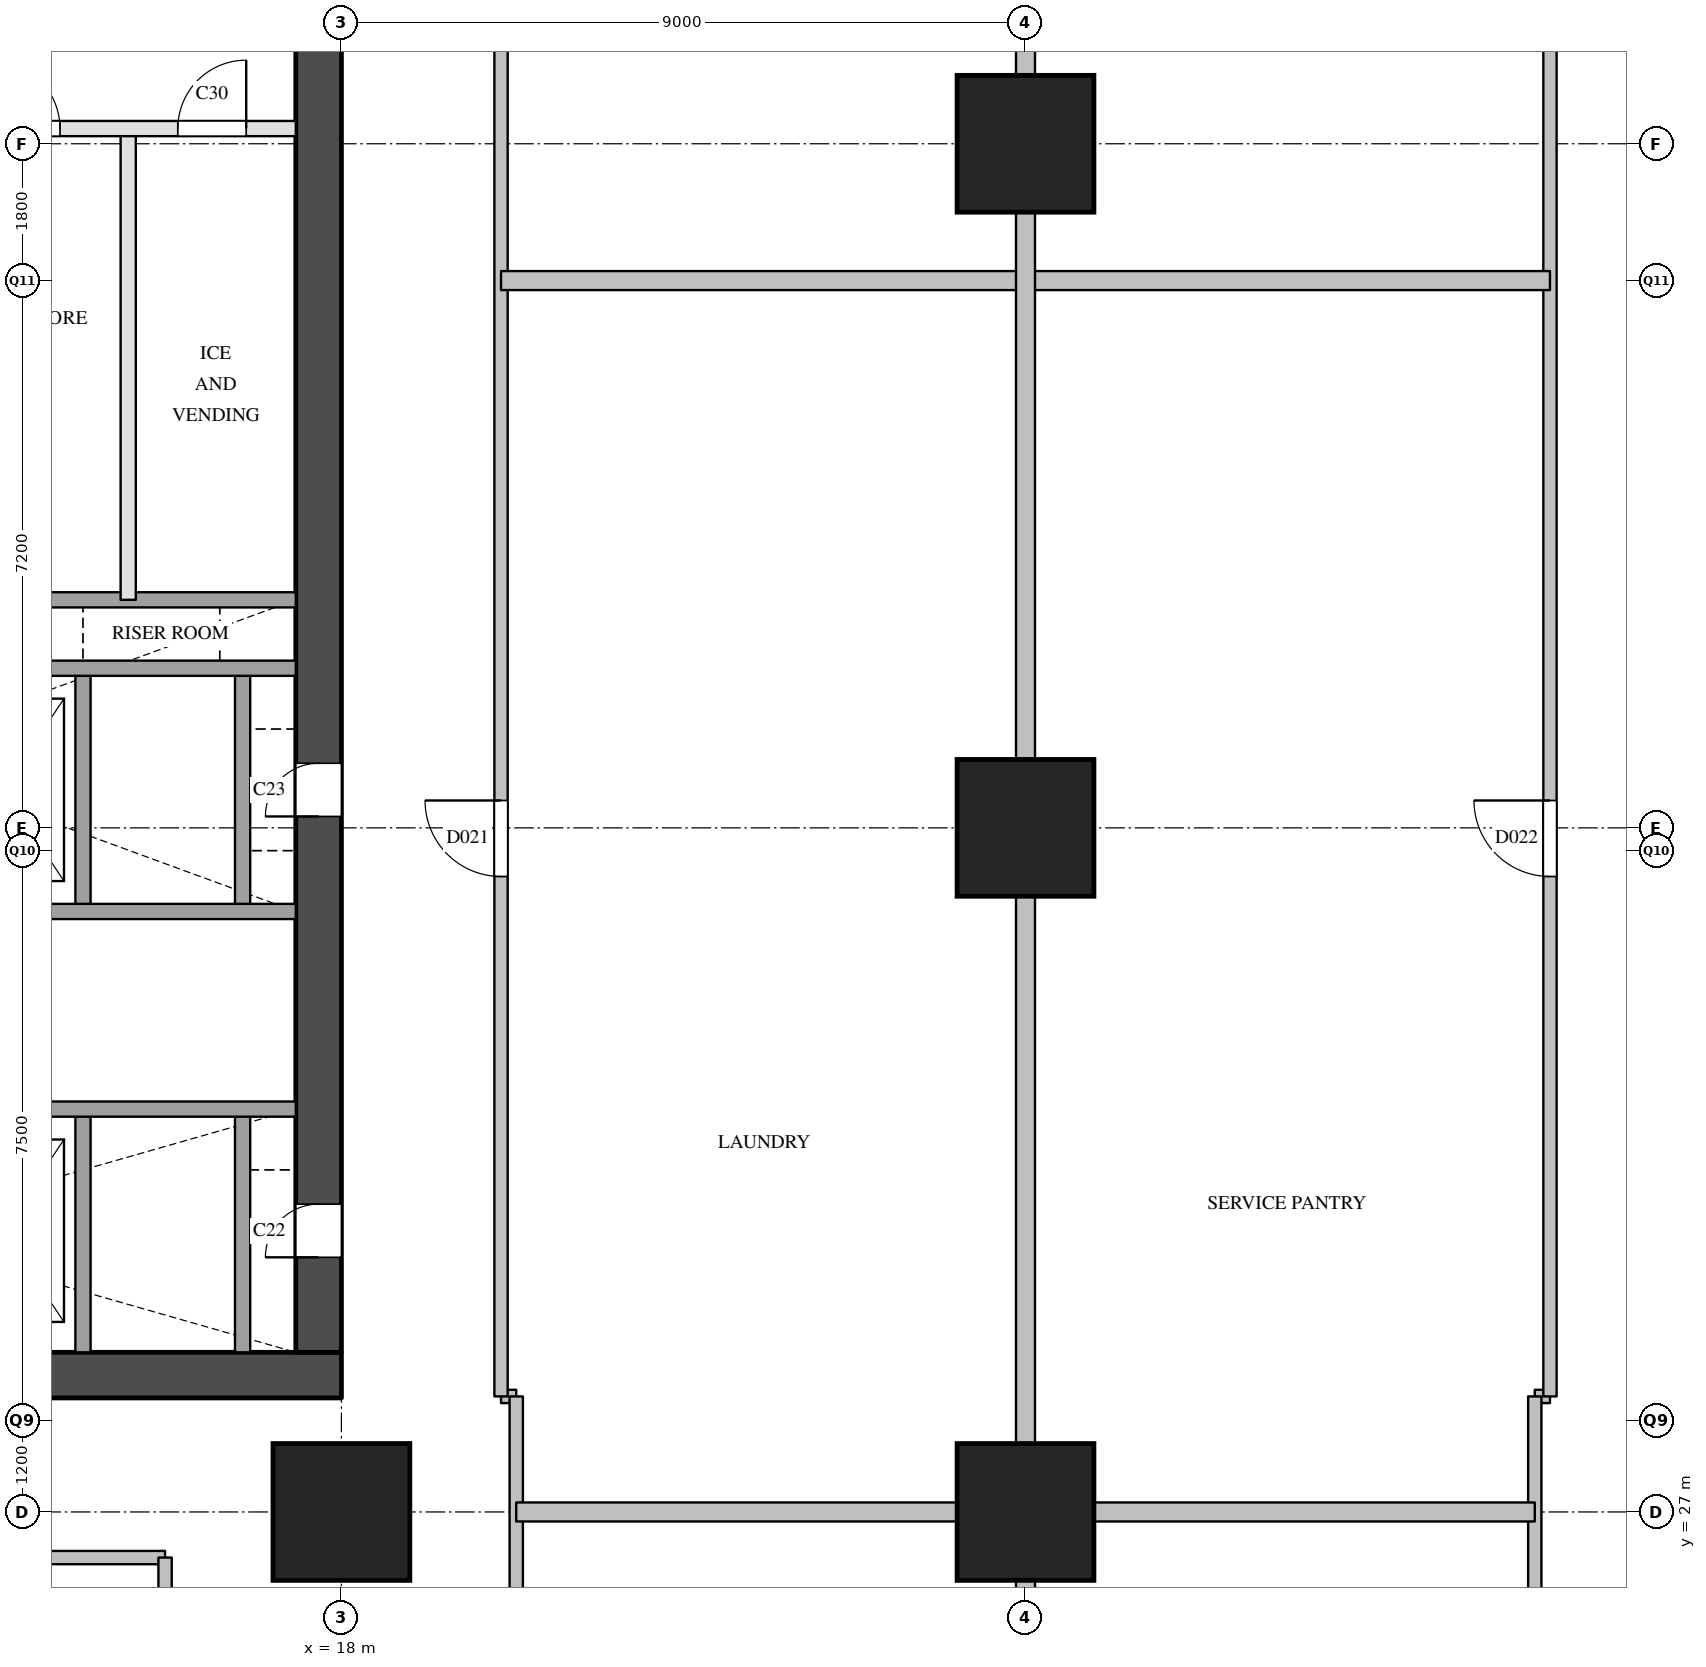
"""IFC4 building model, lengths in metres.
Left out: names, types, materials, properties, quantities, classifications, styles, units other than length and angle.
Written with IfcOpenShell. Run it as: python <this file> out.ifc"""

import sys

from ifc_helpers import new_model, si_unit, direction, frame, frame_2d, origin, origin_2d, place, context, subcontext, project, spatial, rectangle, extrude, element, fill, save


model = new_model("IFC4")
c1 = context("Model", 3, precision=1e-05, world=origin(), true_north=direction((0.0, 1.0)))
c2 = subcontext(c1, "Body", "Model", "MODEL_VIEW")
j1 = project(units=[si_unit("LENGTHUNIT", "METRE"), si_unit("PLANEANGLEUNIT", "RADIAN")], contexts=[c1])
p1 = place(None, origin())
s1 = spatial("IfcSite", under=j1, at=p1, CompositionType="ELEMENT")
p2 = place(p1, origin())
s2 = spatial("IfcBuilding", under=s1, at=p2, CompositionType="ELEMENT")
p3 = place(p2, frame((0.0, 0.0, 61.4)))
s3 = spatial("IfcBuildingStorey", under=s2, at=p3, CompositionType="ELEMENT", Elevation=61.4)
for number, where, z_axis, x_axis in (
    (1, (18.0, 27.0, 0.0), (0.0, 0.0, 1.0), (1.0, 0.0, 0.0)),
    (2, (27.0, 27.0, 0.0), (0.0, 0.0, 1.0), (1.0, 0.0, 0.0)),
    (3, (27.0, 36.0, 0.0), (0.0, 0.0, 1.0), (1.0, 0.0, 0.0)),
    (4, (27.0, 45.0, 0.0), (0.0, 0.0, 1.0), (1.0, 0.0, 0.0)),
):
    element("IfcColumn", number, at=place(p3, frame(where, z_axis=z_axis, x_axis=x_axis)), inside=s3, PredefinedType="COLUMN", context=c2, shape_type="SweptSolid", body=[
        extrude(rectangle(XDim=1.8, YDim=1.8, at=origin_2d()), origin(), (0.0, 0.0, 1.0), 3.8),
    ])
p4 = place(p3, frame((5.6, 28.8, 0.0), z_axis=(0.0, 0.0, 1.0), x_axis=(1.0, 0.0, 0.0)))
e5 = element("IfcWall", 5, at=p4, inside=s3, PredefinedType="SHEAR", context=c2, shape_type="SweptSolid", body=[
    extrude(rectangle(XDim=12.4, YDim=0.6, at=frame_2d((6.2, 0.0))), origin(), (0.0, 0.0, 1.0), 3.5),
])
p5 = place(p4, frame((1.05, 0.0, 0.0)))
e6 = element("IfcOpeningElement", 6, at=p5, cuts=e5, PredefinedType="OPENING", context=c2, shape_type="SweptSolid", body=[
    extrude(rectangle(XDim=1.2, YDim=2.1, at=frame_2d((0.6, 1.05))), frame((0.0, 0.31, 0.0), z_axis=(0.0, -1.0, 0.0), x_axis=(1.0, 0.0, 0.0)), (0.0, 0.0, 1.0), 0.62),
])
p6 = place(p4, frame((5.25, 0.0, 0.0)))
e7 = element("IfcOpeningElement", 7, at=p6, cuts=e5, PredefinedType="OPENING", context=c2, shape_type="SweptSolid", body=[
    extrude(rectangle(XDim=1.2, YDim=2.1, at=frame_2d((0.6, 1.05))), frame((0.0, 0.31, 0.0), z_axis=(0.0, -1.0, 0.0), x_axis=(1.0, 0.0, 0.0)), (0.0, 0.0, 1.0), 0.62),
])
p7 = place(p4, frame((7.35, 0.0, 0.0)))
e8 = element("IfcOpeningElement", 8, at=p7, cuts=e5, PredefinedType="OPENING", context=c2, shape_type="SweptSolid", body=[
    extrude(rectangle(XDim=1.2, YDim=2.1, at=frame_2d((0.6, 1.05))), frame((0.0, 0.31, 0.0), z_axis=(0.0, -1.0, 0.0), x_axis=(1.0, 0.0, 0.0)), (0.0, 0.0, 1.0), 0.62),
])
p8 = place(p3, frame((17.7, 29.1, 0.0), z_axis=(0.0, 0.0, 1.0), x_axis=(0.0, 1.0, 0.0)))
e9 = element("IfcWall", 9, at=p8, inside=s3, PredefinedType="SHEAR", context=c2, shape_type="SweptSolid", body=[
    extrude(rectangle(XDim=20.3, YDim=0.6, at=frame_2d((10.15, 0.0))), origin(), (0.0, 0.0, 1.0), 3.5),
])
p9 = place(p8, frame((1.25, 0.0, 0.0)))
e10 = element("IfcOpeningElement", 10, at=p9, cuts=e9, PredefinedType="OPENING", context=c2, shape_type="SweptSolid", body=[
    extrude(rectangle(XDim=0.7, YDim=2.1, at=frame_2d((0.35, 1.05))), frame((0.0, 0.31, 0.0), z_axis=(0.0, -1.0, 0.0), x_axis=(1.0, 0.0, 0.0)), (0.0, 0.0, 1.0), 0.62),
])
p10 = place(p8, frame((7.05, 0.0, 0.0)))
e11 = element("IfcOpeningElement", 11, at=p10, cuts=e9, PredefinedType="OPENING", context=c2, shape_type="SweptSolid", body=[
    extrude(rectangle(XDim=0.7, YDim=2.1, at=frame_2d((0.35, 1.05))), frame((0.0, 0.31, 0.0), z_axis=(0.0, -1.0, 0.0), x_axis=(1.0, 0.0, 0.0)), (0.0, 0.0, 1.0), 0.62),
])
p11 = place(p3, frame((14.6, 29.1, 0.0), z_axis=(0.0, 0.0, 1.0), x_axis=(0.0, 1.0, 0.0)))
e12 = element("IfcWall", 12, at=p11, inside=s3, PredefinedType="SOLIDWALL", context=c2, shape_type="SweptSolid", body=[
    extrude(rectangle(XDim=3.2, YDim=0.2, at=frame_2d((1.6, 0.0))), origin(), (0.0, 0.0, 1.0), 3.5),
])
p12 = place(p3, frame((14.6, 34.9, 0.0), z_axis=(0.0, 0.0, 1.0), x_axis=(0.0, 1.0, 0.0)))
e13 = element("IfcWall", 13, at=p12, inside=s3, PredefinedType="SOLIDWALL", context=c2, shape_type="SweptSolid", body=[
    extrude(rectangle(XDim=3.2, YDim=0.2, at=frame_2d((1.6, 0.0))), origin(), (0.0, 0.0, 1.0), 3.5),
])
p13 = place(p3, frame((15.195, 39.0, 0.0), z_axis=(0.0, 0.0, 1.0), x_axis=(0.0, 1.0, 0.0)))
e14 = element("IfcWall", 14, at=p13, inside=s3, PredefinedType="PARTITIONING", context=c2, shape_type="SweptSolid", body=[
    extrude(rectangle(XDim=6.2, YDim=0.2, at=frame_2d((3.1, 0.0))), origin(), (0.0, 0.0, 1.0), 3.5),
])
p14 = place(p3, frame((16.7, 29.1, 0.0), z_axis=(0.0, 0.0, 1.0), x_axis=(0.0, 1.0, 0.0)))
e15 = element("IfcWall", 15, at=p14, inside=s3, PredefinedType="SOLIDWALL", context=c2, shape_type="SweptSolid", body=[
    extrude(rectangle(XDim=3.2, YDim=0.2, at=frame_2d((1.6, 0.0))), origin(), (0.0, 0.0, 1.0), 3.5),
])
p15 = place(p3, frame((16.7, 34.9, 0.0), z_axis=(0.0, 0.0, 1.0), x_axis=(0.0, 1.0, 0.0)))
e16 = element("IfcWall", 16, at=p15, inside=s3, PredefinedType="SOLIDWALL", context=c2, shape_type="SweptSolid", body=[
    extrude(rectangle(XDim=3.2, YDim=0.2, at=frame_2d((1.6, 0.0))), origin(), (0.0, 0.0, 1.0), 3.5),
])
p16 = place(p3, frame((6.2, 32.3, 0.0), z_axis=(0.0, 0.0, 1.0), x_axis=(1.0, 0.0, 0.0)))
e17 = element("IfcWall", 17, at=p16, inside=s3, PredefinedType="SOLIDWALL", context=c2, shape_type="SweptSolid", body=[
    extrude(rectangle(XDim=11.2, YDim=0.2, at=frame_2d((5.6, 0.0))), origin(), (0.0, 0.0, 1.0), 3.5),
])
p17 = place(p16, frame((2.55, 0.0, 0.0)))
e18 = element("IfcOpeningElement", 18, at=p17, cuts=e17, PredefinedType="OPENING", context=c2, shape_type="SweptSolid", body=[
    extrude(rectangle(XDim=1.2, YDim=2.1, at=frame_2d((0.6, 1.05))), frame((0.0, 0.11, 0.0), z_axis=(0.0, -1.0, 0.0), x_axis=(1.0, 0.0, 0.0)), (0.0, 0.0, 1.0), 0.22),
])
p18 = place(p3, frame((6.2, 34.9, 0.0), z_axis=(0.0, 0.0, 1.0), x_axis=(1.0, 0.0, 0.0)))
e19 = element("IfcWall", 19, at=p18, inside=s3, PredefinedType="SOLIDWALL", context=c2, shape_type="SweptSolid", body=[
    extrude(rectangle(XDim=11.2, YDim=0.2, at=frame_2d((5.6, 0.0))), origin(), (0.0, 0.0, 1.0), 3.5),
])
p19 = place(p3, frame((6.2, 38.1, 0.0), z_axis=(0.0, 0.0, 1.0), x_axis=(1.0, 0.0, 0.0)))
e20 = element("IfcWall", 20, at=p19, inside=s3, PredefinedType="SOLIDWALL", context=c2, shape_type="SweptSolid", body=[
    extrude(rectangle(XDim=11.2, YDim=0.2, at=frame_2d((5.6, 0.0))), origin(), (0.0, 0.0, 1.0), 3.5),
])
p20 = place(p19, frame((0.45, 0.0, 0.0)))
e21 = element("IfcOpeningElement", 21, at=p20, cuts=e20, PredefinedType="OPENING", context=c2, shape_type="SweptSolid", body=[
    extrude(rectangle(XDim=1.2, YDim=2.1, at=frame_2d((0.6, 1.05))), frame((0.0, 0.11, 0.0), z_axis=(0.0, -1.0, 0.0), x_axis=(1.0, 0.0, 0.0)), (0.0, 0.0, 1.0), 0.22),
])
p21 = place(p19, frame((2.55, 0.0, 0.0)))
e22 = element("IfcOpeningElement", 22, at=p21, cuts=e20, PredefinedType="OPENING", context=c2, shape_type="SweptSolid", body=[
    extrude(rectangle(XDim=1.2, YDim=2.1, at=frame_2d((0.6, 1.05))), frame((0.0, 0.11, 0.0), z_axis=(0.0, -1.0, 0.0), x_axis=(1.0, 0.0, 0.0)), (0.0, 0.0, 1.0), 0.22),
])
p22 = place(p19, frame((4.65, 0.0, 0.0)))
e23 = element("IfcOpeningElement", 23, at=p22, cuts=e20, PredefinedType="OPENING", context=c2, shape_type="SweptSolid", body=[
    extrude(rectangle(XDim=1.2, YDim=2.1, at=frame_2d((0.6, 1.05))), frame((0.0, 0.11, 0.0), z_axis=(0.0, -1.0, 0.0), x_axis=(1.0, 0.0, 0.0)), (0.0, 0.0, 1.0), 0.22),
])
p23 = place(p19, frame((6.75, 0.0, 0.0)))
e24 = element("IfcOpeningElement", 24, at=p23, cuts=e20, PredefinedType="OPENING", context=c2, shape_type="SweptSolid", body=[
    extrude(rectangle(XDim=1.2, YDim=2.1, at=frame_2d((0.6, 1.05))), frame((0.0, 0.11, 0.0), z_axis=(0.0, -1.0, 0.0), x_axis=(1.0, 0.0, 0.0)), (0.0, 0.0, 1.0), 0.22),
])
p24 = place(p3, frame((12.5, 39.0, 0.0), z_axis=(0.0, 0.0, 1.0), x_axis=(1.0, 0.0, 0.0)))
e25 = element("IfcWall", 25, at=p24, inside=s3, PredefinedType="SOLIDWALL", context=c2, shape_type="SweptSolid", body=[
    extrude(rectangle(XDim=4.9, YDim=0.2, at=frame_2d((2.45, 0.0))), origin(), (0.0, 0.0, 1.0), 3.5),
])
p25 = place(p3, frame((12.5, 45.2, 0.0), z_axis=(0.0, 0.0, 1.0), x_axis=(1.0, 0.0, 0.0)))
e26 = element("IfcWall", 26, at=p25, inside=s3, PredefinedType="PARTITIONING", context=c2, shape_type="SweptSolid", body=[
    extrude(rectangle(XDim=4.9, YDim=0.2, at=frame_2d((2.45, 0.0))), origin(), (0.0, 0.0, 1.0), 3.5),
])
p26 = place(p25, frame((0.897, 0.0, 0.0)))
e27 = element("IfcOpeningElement", 27, at=p26, cuts=e26, PredefinedType="OPENING", context=c2, shape_type="SweptSolid", body=[
    extrude(rectangle(XDim=0.9, YDim=2.1, at=frame_2d((0.45, 1.05))), frame((0.0, 0.11, 0.0), z_axis=(0.0, -1.0, 0.0), x_axis=(1.0, 0.0, 0.0)), (0.0, 0.0, 1.0), 0.22),
])
p27 = place(p25, frame((3.347, 0.0, 0.0)))
e28 = element("IfcOpeningElement", 28, at=p27, cuts=e26, PredefinedType="OPENING", context=c2, shape_type="SweptSolid", body=[
    extrude(rectangle(XDim=0.9, YDim=2.1, at=frame_2d((0.45, 1.05))), frame((0.0, 0.11, 0.0), z_axis=(0.0, -1.0, 0.0), x_axis=(1.0, 0.0, 0.0)), (0.0, 0.0, 1.0), 0.22),
])
p28 = place(p3, frame((11.32, 26.4, 0.0), z_axis=(0.0, 0.0, 1.0), x_axis=(1.0, 0.0, 0.0)))
e29 = element("IfcWall", 29, at=p28, inside=s3, PredefinedType="PARTITIONING", context=c2, shape_type="SweptSolid", body=[
    extrude(rectangle(XDim=4.36, YDim=0.175, at=frame_2d((2.18, 0.0))), origin(), (0.0, 0.0, 1.0), 3.5),
])
for number, where, z_axis, x_axis in (
    (30, (20.1, 28.52, 0.0), (0.0, 0.0, 1.0), (1.0, 0.0, 0.0)),
    (31, (33.7, 28.52, 0.0), (0.0, 0.0, 1.0), (1.0, 0.0, 0.0)),
):
    element("IfcWall", number, at=place(p3, frame(where, z_axis=z_axis, x_axis=x_axis)), inside=s3, PredefinedType="PARTITIONING", context=c2, shape_type="SweptSolid", body=[
        extrude(rectangle(XDim=0.2, YDim=0.175, at=frame_2d((0.1, 0.0))), origin(), (0.0, 0.0, 1.0), 3.5),
    ])
p29 = place(p3, frame((15.68, 24.6, 0.0), z_axis=(0.0, 0.0, 1.0), x_axis=(0.0, 1.0, 0.0)))
e32 = element("IfcWall", 32, at=p29, inside=s3, PredefinedType="PARTITIONING", context=c2, shape_type="SweptSolid", body=[
    extrude(rectangle(XDim=1.8, YDim=0.175, at=frame_2d((0.9, 0.0))), origin(), (0.0, 0.0, 1.0), 3.5),
])
p30 = place(p3, frame((20.1, 28.52, 0.0), z_axis=(0.0, 0.0, 1.0), x_axis=(0.0, 1.0, 0.0)))
e33 = element("IfcWall", 33, at=p30, inside=s3, PredefinedType="PARTITIONING", context=c2, shape_type="SweptSolid", body=[
    extrude(rectangle(XDim=23.58, YDim=0.175, at=frame_2d((11.79, 0.0))), origin(), (0.0, 0.0, 1.0), 3.5),
])
p31 = place(p30, frame((6.84, 0.0, 0.0)))
e34 = element("IfcOpeningElement", 34, at=p31, cuts=e33, PredefinedType="OPENING", context=c2, shape_type="SweptSolid", body=[
    extrude(rectangle(XDim=1.0, YDim=2.1, at=frame_2d((0.5, 1.05))), frame((0.0, 0.097, 0.0), z_axis=(0.0, -1.0, 0.0), x_axis=(1.0, 0.0, 0.0)), (0.0, 0.0, 1.0), 0.195),
])
for number, where, z_axis, x_axis in (
    (35, (20.3, 24.59, 0.0), (0.0, 0.0, 1.0), (0.0, 1.0, 0.0)),
    (36, (33.7, 24.59, 0.0), (0.0, 0.0, 1.0), (0.0, 1.0, 0.0)),
):
    element("IfcWall", number, at=place(p3, frame(where, z_axis=z_axis, x_axis=x_axis)), inside=s3, PredefinedType="PARTITIONING", context=c2, shape_type="SweptSolid", body=[
        extrude(rectangle(XDim=3.93, YDim=0.175, at=frame_2d((1.965, 0.0))), origin(), (0.0, 0.0, 1.0), 2.5),
    ])
p32 = place(p3, frame((33.9, 28.52, 0.0), z_axis=(0.0, 0.0, 1.0), x_axis=(0.0, 1.0, 0.0)))
e37 = element("IfcWall", 37, at=p32, inside=s3, PredefinedType="PARTITIONING", context=c2, shape_type="SweptSolid", body=[
    extrude(rectangle(XDim=23.58, YDim=0.175, at=frame_2d((11.79, 0.0))), origin(), (0.0, 0.0, 1.0), 3.5),
])
p33 = place(p32, frame((6.84, 0.0, 0.0)))
e38 = element("IfcOpeningElement", 38, at=p33, cuts=e37, PredefinedType="OPENING", context=c2, shape_type="SweptSolid", body=[
    extrude(rectangle(XDim=1.0, YDim=2.1, at=frame_2d((0.5, 1.05))), frame((0.0, 0.097, 0.0), z_axis=(0.0, -1.0, 0.0), x_axis=(1.0, 0.0, 0.0)), (0.0, 0.0, 1.0), 0.195),
])
p34 = place(p32, frame((18.68, 0.0, 0.0)))
e39 = element("IfcOpeningElement", 39, at=p34, cuts=e37, PredefinedType="OPENING", context=c2, shape_type="SweptSolid", body=[
    extrude(rectangle(XDim=0.9, YDim=2.1, at=frame_2d((0.45, 1.05))), frame((0.0, 0.097, 0.0), z_axis=(0.0, -1.0, 0.0), x_axis=(1.0, 0.0, 0.0)), (0.0, 0.0, 1.0), 0.195),
])
p35 = place(p3, frame((20.3, 27.0, 0.0), z_axis=(0.0, 0.0, 1.0), x_axis=(1.0, 0.0, 0.0)))
e40 = element("IfcWall", 40, at=p35, inside=s3, PredefinedType="PARTITIONING", context=c2, shape_type="SweptSolid", body=[
    extrude(rectangle(XDim=13.4, YDim=0.25, at=frame_2d((6.7, 0.0))), origin(), (0.0, 0.0, 1.0), 2.5),
])
p36 = place(p3, frame((20.1, 43.2, 0.0), z_axis=(0.0, 0.0, 1.0), x_axis=(1.0, 0.0, 0.0)))
e41 = element("IfcWall", 41, at=p36, inside=s3, PredefinedType="PARTITIONING", context=c2, shape_type="SweptSolid", body=[
    extrude(rectangle(XDim=13.8, YDim=0.25, at=frame_2d((6.9, 0.0))), origin(), (0.0, 0.0, 1.0), 2.5),
])
p37 = place(p3, frame((27.0, 0.0, 0.0), z_axis=(0.0, 0.0, 1.0), x_axis=(0.0, 1.0, 0.0)))
e42 = element("IfcWall", 42, at=p37, inside=s3, PredefinedType="PARTITIONING", context=c2, shape_type="SweptSolid", body=[
    extrude(rectangle(XDim=54.0, YDim=0.25, at=frame_2d((27.0, 0.0))), origin(), (0.0, 0.0, 1.0), 2.5),
])
p38 = place(p9, origin())
e43 = element("IfcDoor", 43, at=p38, inside=s3, OperationType="SINGLE_SWING_LEFT", PredefinedType="DOOR", context=c2, shape_type="SweptSolid", body=[
    extrude(rectangle(XDim=0.7, YDim=2.1, at=frame_2d((0.35, 1.05))), frame((0.0, 0.025, 0.0), z_axis=(0.0, -1.0, 0.0), x_axis=(1.0, 0.0, 0.0)), (0.0, 0.0, 1.0), 0.05),
])
fill(e10, e43)
p39 = place(p10, origin())
e44 = element("IfcDoor", 44, at=p39, inside=s3, OperationType="SINGLE_SWING_LEFT", PredefinedType="DOOR", context=c2, shape_type="SweptSolid", body=[
    extrude(rectangle(XDim=0.7, YDim=2.1, at=frame_2d((0.35, 1.05))), frame((0.0, 0.025, 0.0), z_axis=(0.0, -1.0, 0.0), x_axis=(1.0, 0.0, 0.0)), (0.0, 0.0, 1.0), 0.05),
])
fill(e11, e44)
p40 = place(p26, origin())
e45 = element("IfcDoor", 45, at=p40, inside=s3, OperationType="SINGLE_SWING_LEFT", PredefinedType="DOOR", context=c2, shape_type="SweptSolid", body=[
    extrude(rectangle(XDim=0.9, YDim=2.1, at=frame_2d((0.45, 1.05))), frame((0.0, 0.025, 0.0), z_axis=(0.0, -1.0, 0.0), x_axis=(1.0, 0.0, 0.0)), (0.0, 0.0, 1.0), 0.05),
])
fill(e27, e45)
p41 = place(p27, origin())
e46 = element("IfcDoor", 46, at=p41, inside=s3, OperationType="SINGLE_SWING_RIGHT", PredefinedType="DOOR", context=c2, shape_type="SweptSolid", body=[
    extrude(rectangle(XDim=0.9, YDim=2.1, at=frame_2d((0.45, 1.05))), frame((0.0, 0.025, 0.0), z_axis=(0.0, -1.0, 0.0), x_axis=(1.0, 0.0, 0.0)), (0.0, 0.0, 1.0), 0.05),
])
fill(e28, e46)
p42 = place(p31, origin())
e47 = element("IfcDoor", 47, at=p42, inside=s3, OperationType="SINGLE_SWING_RIGHT", PredefinedType="DOOR", context=c2, shape_type="SweptSolid", body=[
    extrude(rectangle(XDim=1.0, YDim=2.1, at=frame_2d((0.5, 1.05))), frame((0.0, 0.025, 0.0), z_axis=(0.0, -1.0, 0.0), x_axis=(1.0, 0.0, 0.0)), (0.0, 0.0, 1.0), 0.05),
])
fill(e34, e47)
p43 = place(p33, origin())
e48 = element("IfcDoor", 48, at=p43, inside=s3, OperationType="SINGLE_SWING_RIGHT", PredefinedType="DOOR", context=c2, shape_type="SweptSolid", body=[
    extrude(rectangle(XDim=1.0, YDim=2.1, at=frame_2d((0.5, 1.05))), frame((0.0, 0.025, 0.0), z_axis=(0.0, -1.0, 0.0), x_axis=(1.0, 0.0, 0.0)), (0.0, 0.0, 1.0), 0.05),
])
fill(e38, e48)
save(model, sys.argv[1])
